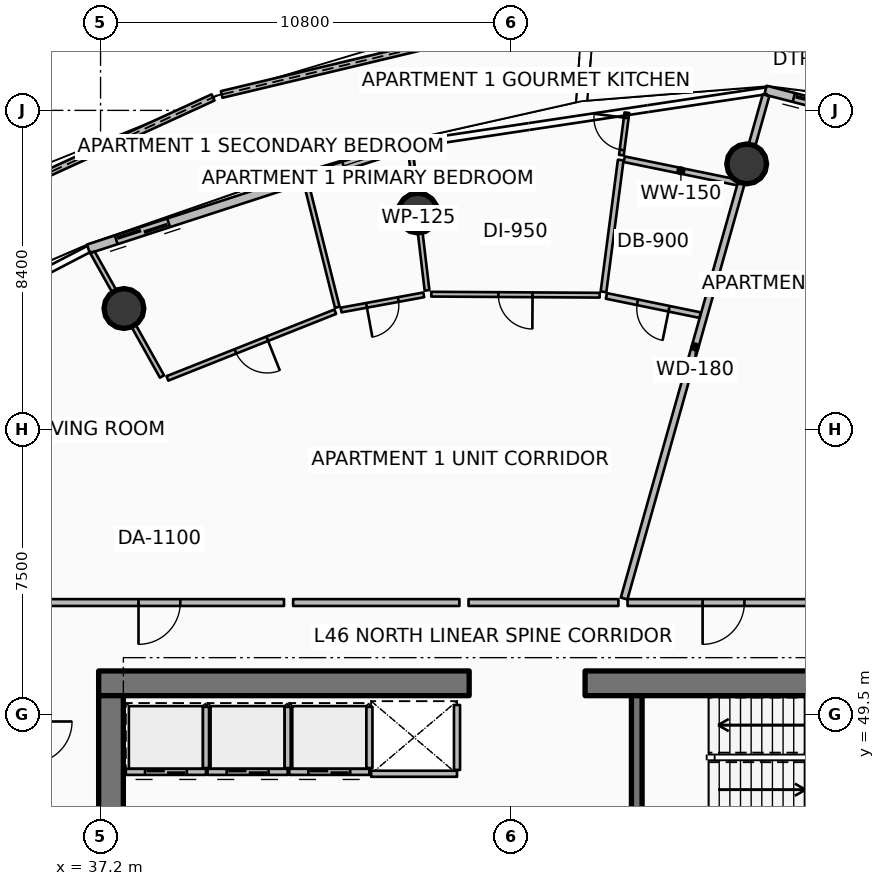
"""IFC4 building model, lengths in metres.
Left out: names, types, materials, properties, quantities, classifications, styles, units other than length and angle.
Written with IfcOpenShell. Run it as: python <this file> out.ifc"""

import sys

from ifc_helpers import new_model, si_unit, direction, frame, frame_2d, origin, origin_2d, place, context, subcontext, project, spatial, polyline, rectangle, circle, outline, extrude, element, fill, save


model = new_model("IFC4")
c1 = context("Model", 3, precision=1e-05, world=origin(), true_north=direction((0.0, 1.0)))
c2 = subcontext(c1, "Body", "Model", "MODEL_VIEW")
j1 = project(units=[si_unit("LENGTHUNIT", "METRE"), si_unit("PLANEANGLEUNIT", "RADIAN")], contexts=[c1])
p1 = place(None, origin())
s1 = spatial("IfcSite", under=j1, at=p1, CompositionType="ELEMENT")
p2 = place(p1, origin())
s2 = spatial("IfcBuilding", under=s1, at=p2, CompositionType="ELEMENT")
p3 = place(p2, frame((0.0, 0.0, 184.05)))
s3 = spatial("IfcBuildingStorey", under=s2, at=p3, CompositionType="ELEMENT", Elevation=184.05)
for number, where, z_axis, x_axis in (
    (1, (37.15, 50.325, 0.0), (0.0, 0.0, 1.0), (1.0, 0.0, 0.0)),
    (2, (49.95, 50.325, 0.0), (0.0, 0.0, 1.0), (1.0, 0.0, 0.0)),
):
    element("IfcWall", number, at=place(p3, frame(where, z_axis=z_axis, x_axis=x_axis)), inside=s3, PredefinedType="SHEAR", context=c2, shape_type="SweptSolid", body=[
        extrude(rectangle(XDim=9.75, YDim=0.65, at=frame_2d((4.875, 0.0))), origin(), (0.0, 0.0, 1.0), 3.75),
    ])
p4 = place(p3, frame((37.475, 34.0, 0.0), z_axis=(0.0, 0.0, 1.0), x_axis=(0.0, 1.0, 0.0)))
e3 = element("IfcWall", 3, at=p4, inside=s3, PredefinedType="SHEAR", context=c2, shape_type="SweptSolid", body=[
    extrude(rectangle(XDim=16.0, YDim=0.65, at=frame_2d((8.0, 0.0))), origin(), (0.0, 0.0, 1.0), 3.75),
])
p5 = place(p3, frame((51.31, 46.5, 0.0), z_axis=(0.0, 0.0, 1.0), x_axis=(0.0, 1.0, 0.0)))
e4 = element("IfcWall", 4, at=p5, inside=s3, PredefinedType="SHEAR", context=c2, shape_type="SweptSolid", body=[
    extrude(rectangle(XDim=3.5, YDim=0.28, at=frame_2d((1.75, 0.0))), origin(), (0.0, 0.0, 1.0), 3.75),
])
for number, where, z_axis, x_axis in (
    (5, (54.202, 63.992, 0.0), (0.0, 0.0, 1.0), (1.0, 0.0, 0.0)),
    (6, (45.55, 62.7, 0.0), (0.0, 0.0, 1.0), (1.0, 0.0, 0.0)),
    (7, (37.815, 60.186, 0.0), (0.0, 0.0, 1.0), (1.0, 0.0, 0.0)),
):
    element("IfcColumn", number, at=place(p3, frame(where, z_axis=z_axis, x_axis=x_axis)), inside=s3, PredefinedType="COLUMN", context=c2, shape_type="SweptSolid", body=[
        extrude(circle(Radius=0.525, at=origin_2d()), origin(), (0.0, 0.0, 1.0), 3.5),
    ])
p6 = place(p3, frame((49.893, 68.084, 0.0), z_axis=(0.0, 0.0, 1.0), x_axis=(-0.972746941522, -0.231869333374, 0.0)))
e8 = element("IfcWall", 8, at=p6, inside=s3, PredefinedType="PARAPET", context=c2, shape_type="SweptSolid", body=[
    extrude(outline(polyline([(0.0, 0.0), (9.772, 0.0), (9.772, 1.832), (4.886, 1.853), (0.0, 1.756), (0.0, 0.0)])), frame((0.0, 0.09, 0.0), z_axis=(0.0, -1.0, 0.0), x_axis=(1.0, 0.0, 0.0)), (0.0, 0.0, 1.0), 0.18),
])
p7 = place(p3, frame((40.161, 65.741, 0.0), z_axis=(0.0, 0.0, 1.0), x_axis=(-0.9090221771, -0.416747743294, 0.0)))
e9 = element("IfcWall", 9, at=p7, inside=s3, PredefinedType="PARAPET", context=c2, shape_type="SweptSolid", body=[
    extrude(outline(polyline([(0.0, 0.0), (9.668, 0.0), (9.668, 1.497), (4.834, 1.696), (0.0, 1.832), (0.0, 0.0)])), frame((0.0, 0.09, 0.0), z_axis=(0.0, -1.0, 0.0), x_axis=(1.0, 0.0, 0.0)), (0.0, 0.0, 1.0), 0.18),
])
p8 = place(p3, frame((64.86, 63.313, 0.0), z_axis=(0.0, 0.0, 1.0), x_axis=(-0.968374028006, 0.249502989727, 0.0)))
e10 = element("IfcWall", 10, at=p8, inside=s3, PredefinedType="SOLIDWALL", context=c2, shape_type="SweptSolid", body=[
    extrude(rectangle(XDim=10.494, YDim=0.24, at=frame_2d((5.247, 0.0))), origin(), (0.0, 0.0, 1.0), 2.45),
])
p9 = place(p8, frame((8.274, 0.0, 0.0)))
e11 = element("IfcOpeningElement", 11, at=p9, cuts=e10, PredefinedType="OPENING", context=c2, shape_type="SweptSolid", body=[
    extrude(rectangle(XDim=1.45, YDim=2.15, at=frame_2d((0.725, 1.075))), frame((0.0, 0.13, 0.0), z_axis=(0.0, -1.0, 0.0), x_axis=(1.0, 0.0, 0.0)), (0.0, 0.0, 1.0), 0.26),
])
p10 = place(p8, frame((0.28, 0.0, 0.65)))
e12 = element("IfcOpeningElement", 12, at=p10, cuts=e10, PredefinedType="OPENING", context=c2, shape_type="SweptSolid", body=[
    extrude(rectangle(XDim=1.6, YDim=1.5, at=frame_2d((0.8, 0.75))), frame((0.0, 0.13, 0.0), z_axis=(0.0, -1.0, 0.0), x_axis=(1.0, 0.0, 0.0)), (0.0, 0.0, 1.0), 0.26),
])
p11 = place(p3, frame((45.384, 64.519, 0.0), z_axis=(0.0, 0.0, 1.0), x_axis=(-0.951058543936, -0.309010753869, 0.0)))
e13 = element("IfcWall", 13, at=p11, inside=s3, PredefinedType="SOLIDWALL", context=c2, shape_type="SweptSolid", body=[
    extrude(rectangle(XDim=8.942, YDim=0.24, at=frame_2d((4.471, 0.0))), origin(), (0.0, 0.0, 1.0), 2.45),
])
p12 = place(p11, frame((6.722, 0.0, 0.0)))
e14 = element("IfcOpeningElement", 14, at=p12, cuts=e13, PredefinedType="OPENING", context=c2, shape_type="SweptSolid", body=[
    extrude(rectangle(XDim=1.45, YDim=2.15, at=frame_2d((0.725, 1.075))), frame((0.0, 0.13, 0.0), z_axis=(0.0, -1.0, 0.0), x_axis=(1.0, 0.0, 0.0)), (0.0, 0.0, 1.0), 0.26),
])
p13 = place(p11, frame((0.28, 0.0, 0.65)))
e15 = element("IfcOpeningElement", 15, at=p13, cuts=e13, PredefinedType="OPENING", context=c2, shape_type="SweptSolid", body=[
    extrude(rectangle(XDim=1.6, YDim=1.5, at=frame_2d((0.8, 0.75))), frame((0.0, 0.13, 0.0), z_axis=(0.0, -1.0, 0.0), x_axis=(1.0, 0.0, 0.0)), (0.0, 0.0, 1.0), 0.26),
])
p14 = place(p3, frame((39.975, 47.995, 0.0), z_axis=(0.0, 0.0, 1.0), x_axis=(-1.0, 0.0, 0.0)))
e16 = element("IfcWall", 16, at=p14, inside=s3, PredefinedType="PARTITIONING", context=c2, shape_type="SweptSolid", body=[
    extrude(rectangle(XDim=2.11, YDim=0.16, at=frame_2d((1.055, 0.0))), origin(), (0.0, 0.0, 1.0), 3.5),
])
p15 = place(p14, frame((0.505, 0.0, 0.0)))
e17 = element("IfcOpeningElement", 17, at=p15, cuts=e16, PredefinedType="OPENING", context=c2, shape_type="SweptSolid", body=[
    extrude(rectangle(XDim=1.1, YDim=2.1, at=frame_2d((0.55, 1.05))), frame((0.0, 0.09, 0.0), z_axis=(0.0, -1.0, 0.0), x_axis=(1.0, 0.0, 0.0)), (0.0, 0.0, 1.0), 0.18),
])
p16 = place(p3, frame((39.975, 48.095, 0.0), z_axis=(0.0, 0.0, 1.0), x_axis=(0.0, 1.0, 0.0)))
e18 = element("IfcWall", 18, at=p16, inside=s3, PredefinedType="PARTITIONING", context=c2, shape_type="SweptSolid", body=[
    extrude(rectangle(XDim=1.61, YDim=0.16, at=frame_2d((0.805, 0.0))), origin(), (0.0, 0.0, 1.0), 3.5),
])
p17 = place(p3, frame((42.125, 47.995, 0.0), z_axis=(0.0, 0.0, 1.0), x_axis=(-1.0, 0.0, 0.0)))
e19 = element("IfcWall", 19, at=p17, inside=s3, PredefinedType="PARTITIONING", context=c2, shape_type="SweptSolid", body=[
    extrude(rectangle(XDim=2.11, YDim=0.16, at=frame_2d((1.055, 0.0))), origin(), (0.0, 0.0, 1.0), 3.5),
])
p18 = place(p17, frame((0.505, 0.0, 0.0)))
e20 = element("IfcOpeningElement", 20, at=p18, cuts=e19, PredefinedType="OPENING", context=c2, shape_type="SweptSolid", body=[
    extrude(rectangle(XDim=1.1, YDim=2.1, at=frame_2d((0.55, 1.05))), frame((0.0, 0.09, 0.0), z_axis=(0.0, -1.0, 0.0), x_axis=(1.0, 0.0, 0.0)), (0.0, 0.0, 1.0), 0.18),
])
p19 = place(p3, frame((42.125, 48.095, 0.0), z_axis=(0.0, 0.0, 1.0), x_axis=(0.0, 1.0, 0.0)))
e21 = element("IfcWall", 21, at=p19, inside=s3, PredefinedType="PARTITIONING", context=c2, shape_type="SweptSolid", body=[
    extrude(rectangle(XDim=1.61, YDim=0.16, at=frame_2d((0.805, 0.0))), origin(), (0.0, 0.0, 1.0), 3.5),
])
p20 = place(p3, frame((44.275, 47.995, 0.0), z_axis=(0.0, 0.0, 1.0), x_axis=(-1.0, 0.0, 0.0)))
e22 = element("IfcWall", 22, at=p20, inside=s3, PredefinedType="PARTITIONING", context=c2, shape_type="SweptSolid", body=[
    extrude(rectangle(XDim=2.11, YDim=0.16, at=frame_2d((1.055, 0.0))), origin(), (0.0, 0.0, 1.0), 3.5),
])
p21 = place(p20, frame((0.505, 0.0, 0.0)))
e23 = element("IfcOpeningElement", 23, at=p21, cuts=e22, PredefinedType="OPENING", context=c2, shape_type="SweptSolid", body=[
    extrude(rectangle(XDim=1.1, YDim=2.1, at=frame_2d((0.55, 1.05))), frame((0.0, 0.09, 0.0), z_axis=(0.0, -1.0, 0.0), x_axis=(1.0, 0.0, 0.0)), (0.0, 0.0, 1.0), 0.18),
])
p22 = place(p3, frame((44.275, 48.095, 0.0), z_axis=(0.0, 0.0, 1.0), x_axis=(0.0, 1.0, 0.0)))
e24 = element("IfcWall", 24, at=p22, inside=s3, PredefinedType="PARTITIONING", context=c2, shape_type="SweptSolid", body=[
    extrude(rectangle(XDim=1.61, YDim=0.16, at=frame_2d((0.805, 0.0))), origin(), (0.0, 0.0, 1.0), 3.5),
])
p23 = place(p3, frame((46.58, 47.945, 0.0), z_axis=(0.0, 0.0, 1.0), x_axis=(-1.0, 0.0, 0.0)))
e25 = element("IfcWall", 25, at=p23, inside=s3, PredefinedType="PARTITIONING", context=c2, shape_type="SweptSolid", body=[
    extrude(rectangle(XDim=2.26, YDim=0.16, at=frame_2d((1.13, 0.0))), origin(), (0.0, 0.0, 1.0), 3.5),
])
p24 = place(p3, frame((46.58, 48.045, 0.0), z_axis=(0.0, 0.0, 1.0), x_axis=(0.0, 1.0, 0.0)))
e26 = element("IfcWall", 26, at=p24, inside=s3, PredefinedType="PARTITIONING", context=c2, shape_type="SweptSolid", body=[
    extrude(rectangle(XDim=1.71, YDim=0.16, at=frame_2d((0.855, 0.0))), origin(), (0.0, 0.0, 1.0), 3.5),
])
p25 = place(p3, frame((50.977, 52.556, 0.0), z_axis=(0.0, 0.0, 1.0), x_axis=(0.271443307373, 0.962454430548, 0.0)))
e27 = element("IfcWall", 27, at=p25, inside=s3, PredefinedType="PARTITIONING", context=c2, shape_type="SweptSolid", body=[
    extrude(rectangle(XDim=13.759, YDim=0.18, at=frame_2d((6.88, 0.0))), origin(), (0.0, 0.0, 1.0), 2.94),
])
p26 = place(p3, frame((42.028, 52.45, 0.0), z_axis=(0.0, 0.0, 1.0), x_axis=(-1.0, 0.0, 0.0)))
e28 = element("IfcWall", 28, at=p26, inside=s3, PredefinedType="PARTITIONING", context=c2, shape_type="SweptSolid", body=[
    extrude(rectangle(XDim=6.558, YDim=0.18, at=frame_2d((3.279, 0.0))), origin(), (0.0, 0.0, 1.0), 2.94),
])
p27 = place(p26, frame((2.729, 0.0, 0.0)))
e29 = element("IfcOpeningElement", 29, at=p27, cuts=e28, PredefinedType="OPENING", context=c2, shape_type="SweptSolid", body=[
    extrude(rectangle(XDim=1.1, YDim=2.1, at=frame_2d((0.55, 1.05))), frame((0.0, 0.1, 0.0), z_axis=(0.0, -1.0, 0.0), x_axis=(1.0, 0.0, 0.0)), (0.0, 0.0, 1.0), 0.2),
])
p28 = place(p3, frame((50.827, 52.45, 0.0), z_axis=(0.0, 0.0, 1.0), x_axis=(-1.0, 0.0, 0.0)))
e30 = element("IfcWall", 30, at=p28, inside=s3, PredefinedType="PARTITIONING", context=c2, shape_type="SweptSolid", body=[
    extrude(rectangle(XDim=3.944, YDim=0.18, at=frame_2d((1.972, 0.0))), origin(), (0.0, 0.0, 1.0), 2.94),
])
p29 = place(p3, frame((52.976, 60.012, 0.0), z_axis=(0.0, 0.0, 1.0), x_axis=(-0.979567919456, 0.201113627516, 0.0)))
e31 = element("IfcWall", 31, at=p29, inside=s3, PredefinedType="PARTITIONING", context=c2, shape_type="SweptSolid", body=[
    extrude(rectangle(XDim=2.517, YDim=0.15, at=frame_2d((1.258, 0.0))), origin(), (0.0, 0.0, 1.0), 2.94),
])
p30 = place(p29, frame((0.833, 0.0, 0.0)))
e32 = element("IfcOpeningElement", 32, at=p30, cuts=e31, PredefinedType="OPENING", context=c2, shape_type="SweptSolid", body=[
    extrude(rectangle(XDim=0.85, YDim=2.06, at=frame_2d((0.425, 1.03))), frame((0.0, 0.085, 0.0), z_axis=(0.0, -1.0, 0.0), x_axis=(1.0, 0.0, 0.0)), (0.0, 0.0, 1.0), 0.17),
])
p31 = place(p3, frame((53.961, 63.503, 0.0), z_axis=(0.0, 0.0, 1.0), x_axis=(-0.979589733131, 0.201007349976, 0.0)))
e33 = element("IfcWall", 33, at=p31, inside=s3, PredefinedType="PARTITIONING", context=c2, shape_type="SweptSolid", body=[
    extrude(rectangle(XDim=3.041, YDim=0.15, at=frame_2d((1.521, 0.0))), origin(), (0.0, 0.0, 1.0), 2.94),
])
p32 = place(p3, frame((50.435, 60.625, 0.0), z_axis=(0.0, 0.0, 1.0), x_axis=(0.129574965198, 0.991569628616, 0.0)))
e34 = element("IfcWall", 34, at=p32, inside=s3, PredefinedType="PARTITIONING", context=c2, shape_type="SweptSolid", body=[
    extrude(rectangle(XDim=3.497, YDim=0.15, at=frame_2d((1.749, 0.0))), origin(), (0.0, 0.0, 1.0), 2.94),
])
p33 = place(p3, frame((50.905, 64.222, 0.0), z_axis=(0.0, 0.0, 1.0), x_axis=(0.129607883109, 0.991565326459, 0.0)))
e35 = element("IfcWall", 35, at=p33, inside=s3, PredefinedType="PARTITIONING", context=c2, shape_type="SweptSolid", body=[
    extrude(rectangle(XDim=1.126, YDim=0.125, at=frame_2d((0.563, 0.0))), origin(), (0.0, 0.0, 1.0), 2.94),
])
p34 = place(p33, frame((0.138, 0.0, 0.0)))
e36 = element("IfcOpeningElement", 36, at=p34, cuts=e35, PredefinedType="OPENING", context=c2, shape_type="SweptSolid", body=[
    extrude(rectangle(XDim=0.85, YDim=2.06, at=frame_2d((0.425, 1.03))), frame((0.0, 0.073, 0.0), z_axis=(0.0, -1.0, 0.0), x_axis=(1.0, 0.0, 0.0)), (0.0, 0.0, 1.0), 0.145),
])
p35 = place(p3, frame((50.333, 60.537, 0.0), z_axis=(0.0, 0.0, 1.0), x_axis=(-0.999981626936, 0.006061830649, 0.0)))
e37 = element("IfcWall", 37, at=p35, inside=s3, PredefinedType="PARTITIONING", context=c2, shape_type="SweptSolid", body=[
    extrude(rectangle(XDim=4.43, YDim=0.125, at=frame_2d((2.215, 0.0))), origin(), (0.0, 0.0, 1.0), 2.94),
])
p36 = place(p35, frame((1.765, 0.0, 0.0)))
e38 = element("IfcOpeningElement", 38, at=p36, cuts=e37, PredefinedType="OPENING", context=c2, shape_type="SweptSolid", body=[
    extrude(rectangle(XDim=0.9, YDim=2.08, at=frame_2d((0.45, 1.04))), frame((0.0, 0.073, 0.0), z_axis=(0.0, -1.0, 0.0), x_axis=(1.0, 0.0, 0.0)), (0.0, 0.0, 1.0), 0.145),
])
p37 = place(p3, frame((46.643, 52.45, 0.0), z_axis=(0.0, 0.0, 1.0), x_axis=(-1.0, 0.0, 0.0)))
e39 = element("IfcWall", 39, at=p37, inside=s3, PredefinedType="PARTITIONING", context=c2, shape_type="SweptSolid", body=[
    extrude(rectangle(XDim=4.376, YDim=0.18, at=frame_2d((2.188, 0.0))), origin(), (0.0, 0.0, 1.0), 2.94),
])
p38 = place(p3, frame((45.791, 60.664, 0.0), z_axis=(0.0, 0.0, 1.0), x_axis=(-0.117516047916, 0.993070983607, 0.0)))
e40 = element("IfcWall", 40, at=p38, inside=s3, PredefinedType="PARTITIONING", context=c2, shape_type="SweptSolid", body=[
    extrude(rectangle(XDim=3.841, YDim=0.125, at=frame_2d((1.921, 0.0))), origin(), (0.0, 0.0, 1.0), 2.94),
])
p39 = place(p3, frame((38.817, 58.398, 0.0), z_axis=(0.0, 0.0, 1.0), x_axis=(-0.488615290892, 0.872499339545, 0.0)))
e41 = element("IfcWall", 41, at=p39, inside=s3, PredefinedType="PARTITIONING", context=c2, shape_type="SweptSolid", body=[
    extrude(rectangle(XDim=3.741, YDim=0.125, at=frame_2d((1.871, 0.0))), origin(), (0.0, 0.0, 1.0), 2.94),
])
p40 = place(p3, frame((43.429, 60.219, 0.0), z_axis=(0.0, 0.0, 1.0), x_axis=(-0.243337157577, 0.969941765129, 0.0)))
e42 = element("IfcWall", 42, at=p40, inside=s3, PredefinedType="PARTITIONING", context=c2, shape_type="SweptSolid", body=[
    extrude(rectangle(XDim=3.368, YDim=0.125, at=frame_2d((1.684, 0.0))), origin(), (0.0, 0.0, 1.0), 2.94),
])
p41 = place(p3, frame((45.704, 60.546, 0.0), z_axis=(0.0, 0.0, 1.0), x_axis=(-0.983514725563, -0.180828052584, 0.0)))
e43 = element("IfcWall", 43, at=p41, inside=s3, PredefinedType="PARTITIONING", context=c2, shape_type="SweptSolid", body=[
    extrude(rectangle(XDim=2.211, YDim=0.125, at=frame_2d((1.106, 0.0))), origin(), (0.0, 0.0, 1.0), 2.94),
])
p42 = place(p41, frame((0.681, 0.0, 0.0)))
e44 = element("IfcOpeningElement", 44, at=p42, cuts=e43, PredefinedType="OPENING", context=c2, shape_type="SweptSolid", body=[
    extrude(rectangle(XDim=0.85, YDim=2.06, at=frame_2d((0.425, 1.03))), frame((0.0, 0.073, 0.0), z_axis=(0.0, -1.0, 0.0), x_axis=(1.0, 0.0, 0.0)), (0.0, 0.0, 1.0), 0.145),
])
p43 = place(p3, frame((43.376, 60.103, 0.0), z_axis=(0.0, 0.0, 1.0), x_axis=(-0.92934194707, -0.369220185548, 0.0)))
e45 = element("IfcWall", 45, at=p43, inside=s3, PredefinedType="PARTITIONING", context=c2, shape_type="SweptSolid", body=[
    extrude(rectangle(XDim=4.754, YDim=0.125, at=frame_2d((2.377, 0.0))), origin(), (0.0, 0.0, 1.0), 2.94),
])
p44 = place(p43, frame((1.927, 0.0, 0.0)))
e46 = element("IfcOpeningElement", 46, at=p44, cuts=e45, PredefinedType="OPENING", context=c2, shape_type="SweptSolid", body=[
    extrude(rectangle(XDim=0.9, YDim=2.08, at=frame_2d((0.45, 1.04))), frame((0.0, 0.073, 0.0), z_axis=(0.0, -1.0, 0.0), x_axis=(1.0, 0.0, 0.0)), (0.0, 0.0, 1.0), 0.145),
])
p45 = place(p3, frame((56.118, 52.45, 0.0), z_axis=(0.0, 0.0, 1.0), x_axis=(-1.0, 0.0, 0.0)))
e47 = element("IfcWall", 47, at=p45, inside=s3, PredefinedType="PARTITIONING", context=c2, shape_type="SweptSolid", body=[
    extrude(rectangle(XDim=5.051, YDim=0.18, at=frame_2d((2.525, 0.0))), origin(), (0.0, 0.0, 1.0), 2.94),
])
p46 = place(p45, frame((1.975, 0.0, 0.0)))
e48 = element("IfcOpeningElement", 48, at=p46, cuts=e47, PredefinedType="OPENING", context=c2, shape_type="SweptSolid", body=[
    extrude(rectangle(XDim=1.1, YDim=2.1, at=frame_2d((0.55, 1.05))), frame((0.0, 0.1, 0.0), z_axis=(0.0, -1.0, 0.0), x_axis=(1.0, 0.0, 0.0)), (0.0, 0.0, 1.0), 0.2),
])
p47 = place(p9, origin())
e49 = element("IfcDoor", 49, at=p47, inside=s3, OperationType="DOUBLE_DOOR_SLIDING", PredefinedType="DOOR", context=c2, shape_type="SweptSolid", body=[
    extrude(rectangle(XDim=1.45, YDim=2.15, at=frame_2d((0.725, 1.075))), frame((0.0, 0.025, 0.0), z_axis=(0.0, -1.0, 0.0), x_axis=(1.0, 0.0, 0.0)), (0.0, 0.0, 1.0), 0.05),
])
fill(e11, e49)
p48 = place(p12, origin())
e50 = element("IfcDoor", 50, at=p48, inside=s3, OperationType="DOUBLE_DOOR_SLIDING", PredefinedType="DOOR", context=c2, shape_type="SweptSolid", body=[
    extrude(rectangle(XDim=1.45, YDim=2.15, at=frame_2d((0.725, 1.075))), frame((0.0, 0.025, 0.0), z_axis=(0.0, -1.0, 0.0), x_axis=(1.0, 0.0, 0.0)), (0.0, 0.0, 1.0), 0.05),
])
fill(e14, e50)
p49 = place(p13, origin())
e51 = element("IfcWindow", 51, at=p49, inside=s3, PartitioningType="SINGLE_PANEL", PredefinedType="WINDOW", context=c2, shape_type="SweptSolid", body=[
    extrude(rectangle(XDim=1.6, YDim=1.5, at=frame_2d((0.8, 0.75))), frame((0.0, 0.03, 0.0), z_axis=(0.0, -1.0, 0.0), x_axis=(1.0, 0.0, 0.0)), (0.0, 0.0, 1.0), 0.06),
])
fill(e15, e51)
p50 = place(p15, origin())
e52 = element("IfcDoor", 52, at=p50, inside=s3, OperationType="DOUBLE_DOOR_SLIDING", PredefinedType="DOOR", context=c2, shape_type="SweptSolid", body=[
    extrude(rectangle(XDim=1.1, YDim=2.1, at=frame_2d((0.55, 1.05))), frame((0.0, 0.025, 0.0), z_axis=(0.0, -1.0, 0.0), x_axis=(1.0, 0.0, 0.0)), (0.0, 0.0, 1.0), 0.05),
])
fill(e17, e52)
p51 = place(p18, origin())
e53 = element("IfcDoor", 53, at=p51, inside=s3, OperationType="DOUBLE_DOOR_SLIDING", PredefinedType="DOOR", context=c2, shape_type="SweptSolid", body=[
    extrude(rectangle(XDim=1.1, YDim=2.1, at=frame_2d((0.55, 1.05))), frame((0.0, 0.025, 0.0), z_axis=(0.0, -1.0, 0.0), x_axis=(1.0, 0.0, 0.0)), (0.0, 0.0, 1.0), 0.05),
])
fill(e20, e53)
p52 = place(p21, origin())
e54 = element("IfcDoor", 54, at=p52, inside=s3, OperationType="DOUBLE_DOOR_SLIDING", PredefinedType="DOOR", context=c2, shape_type="SweptSolid", body=[
    extrude(rectangle(XDim=1.1, YDim=2.1, at=frame_2d((0.55, 1.05))), frame((0.0, 0.025, 0.0), z_axis=(0.0, -1.0, 0.0), x_axis=(1.0, 0.0, 0.0)), (0.0, 0.0, 1.0), 0.05),
])
fill(e23, e54)
p53 = place(p27, origin())
e55 = element("IfcDoor", 55, at=p53, inside=s3, OperationType="SINGLE_SWING_RIGHT", PredefinedType="DOOR", context=c2, shape_type="SweptSolid", body=[
    extrude(rectangle(XDim=1.1, YDim=2.1, at=frame_2d((0.55, 1.05))), frame((0.0, 0.025, 0.0), z_axis=(0.0, -1.0, 0.0), x_axis=(1.0, 0.0, 0.0)), (0.0, 0.0, 1.0), 0.05),
])
fill(e29, e55)
p54 = place(p30, origin())
e56 = element("IfcDoor", 56, at=p54, inside=s3, OperationType="SINGLE_SWING_LEFT", PredefinedType="DOOR", context=c2, shape_type="SweptSolid", body=[
    extrude(rectangle(XDim=0.85, YDim=2.06, at=frame_2d((0.425, 1.03))), frame((0.0, 0.025, 0.0), z_axis=(0.0, -1.0, 0.0), x_axis=(1.0, 0.0, 0.0)), (0.0, 0.0, 1.0), 0.05),
])
fill(e32, e56)
p55 = place(p34, origin())
e57 = element("IfcDoor", 57, at=p55, inside=s3, OperationType="SINGLE_SWING_RIGHT", PredefinedType="DOOR", context=c2, shape_type="SweptSolid", body=[
    extrude(rectangle(XDim=0.85, YDim=2.06, at=frame_2d((0.425, 1.03))), frame((0.0, 0.025, 0.0), z_axis=(0.0, -1.0, 0.0), x_axis=(1.0, 0.0, 0.0)), (0.0, 0.0, 1.0), 0.05),
])
fill(e36, e57)
p56 = place(p36, origin())
e58 = element("IfcDoor", 58, at=p56, inside=s3, OperationType="SINGLE_SWING_LEFT", PredefinedType="DOOR", context=c2, shape_type="SweptSolid", body=[
    extrude(rectangle(XDim=0.9, YDim=2.08, at=frame_2d((0.45, 1.04))), frame((0.0, 0.025, 0.0), z_axis=(0.0, -1.0, 0.0), x_axis=(1.0, 0.0, 0.0)), (0.0, 0.0, 1.0), 0.05),
])
fill(e38, e58)
p57 = place(p42, origin())
e59 = element("IfcDoor", 59, at=p57, inside=s3, OperationType="SINGLE_SWING_RIGHT", PredefinedType="DOOR", context=c2, shape_type="SweptSolid", body=[
    extrude(rectangle(XDim=0.85, YDim=2.06, at=frame_2d((0.425, 1.03))), frame((0.0, 0.025, 0.0), z_axis=(0.0, -1.0, 0.0), x_axis=(1.0, 0.0, 0.0)), (0.0, 0.0, 1.0), 0.05),
])
fill(e44, e59)
p58 = place(p44, origin())
e60 = element("IfcDoor", 60, at=p58, inside=s3, OperationType="SINGLE_SWING_LEFT", PredefinedType="DOOR", context=c2, shape_type="SweptSolid", body=[
    extrude(rectangle(XDim=0.9, YDim=2.08, at=frame_2d((0.45, 1.04))), frame((0.0, 0.025, 0.0), z_axis=(0.0, -1.0, 0.0), x_axis=(1.0, 0.0, 0.0)), (0.0, 0.0, 1.0), 0.05),
])
fill(e46, e60)
p59 = place(p46, origin())
e61 = element("IfcDoor", 61, at=p59, inside=s3, OperationType="SINGLE_SWING_RIGHT", PredefinedType="DOOR", context=c2, shape_type="SweptSolid", body=[
    extrude(rectangle(XDim=1.1, YDim=2.1, at=frame_2d((0.55, 1.05))), frame((0.0, 0.025, 0.0), z_axis=(0.0, -1.0, 0.0), x_axis=(1.0, 0.0, 0.0)), (0.0, 0.0, 1.0), 0.05),
])
fill(e48, e61)
save(model, sys.argv[1])
